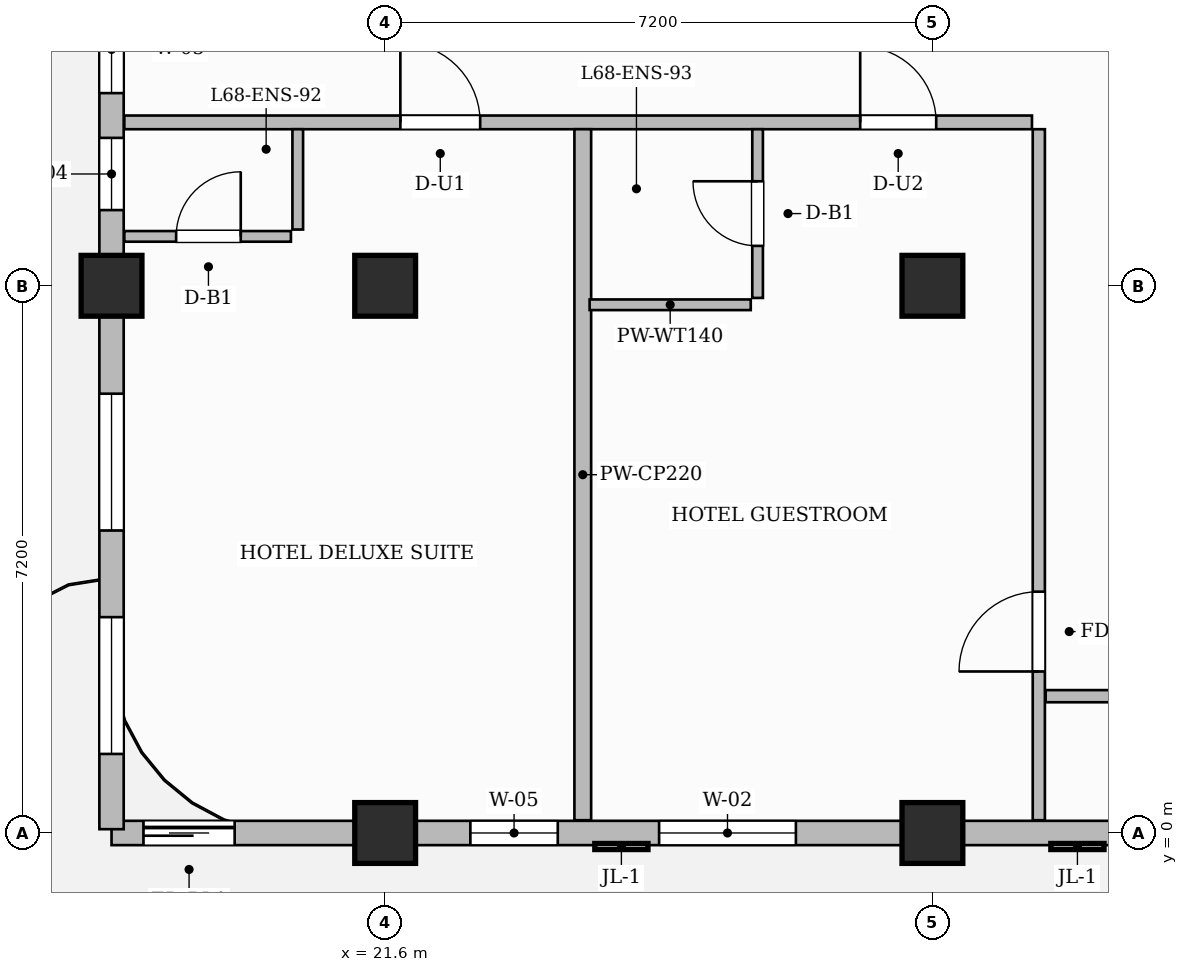
"""IFC4 building model, lengths in metres.
Left out: names, types, materials, properties, quantities, classifications, styles, units other than length and angle.
Written with IfcOpenShell. Run it as: python <this file> out.ifc"""

import sys

from ifc_helpers import new_model, si_unit, direction, frame, frame_2d, origin, origin_2d, place, context, subcontext, project, spatial, rectangle, extrude, source, transform, mapped, element, fill, save


model = new_model("IFC4")
c1 = context("Model", 3, precision=1e-05, world=origin(), true_north=direction((0.0, 1.0)))
c2 = subcontext(c1, "Body", "Model", "MODEL_VIEW")
j1 = project(units=[si_unit("LENGTHUNIT", "METRE"), si_unit("PLANEANGLEUNIT", "RADIAN")], contexts=[c1])
p1 = place(None, origin())
s1 = spatial("IfcSite", under=j1, at=p1, CompositionType="ELEMENT")
p2 = place(p1, origin())
s2 = spatial("IfcBuilding", under=s1, at=p2, CompositionType="ELEMENT")
p3 = place(p2, frame((0.0, 0.0, 271.2)))
s3 = spatial("IfcBuildingStorey", under=s2, at=p3, CompositionType="ELEMENT", Elevation=271.2)
m1 = source(origin(), c2, "Body", "SweptSolid", [
    extrude(rectangle(XDim=0.8, YDim=0.8, at=origin_2d()), origin(), (0.0, 0.0, 1.0), 3.85),
])
for number, where, z_axis, x_axis in (
    (1, (21.6, 0.0, 0.0), (0.0, 0.0, 1.0), (1.0, 0.0, 0.0)),
    (2, (21.6, 7.2, 0.0), (0.0, 0.0, 1.0), (1.0, 0.0, 0.0)),
    (3, (28.8, 0.0, 0.0), (0.0, 0.0, 1.0), (1.0, 0.0, 0.0)),
    (4, (28.8, 7.2, 0.0), (0.0, 0.0, 1.0), (1.0, 0.0, 0.0)),
    (5, (18.0, 7.2, 0.0), (0.0, 0.0, 1.0), (1.0, 0.0, 0.0)),
):
    element("IfcColumn", number, at=place(p3, frame(where, z_axis=z_axis, x_axis=x_axis)), inside=s3, PredefinedType="COLUMN", context=c2, shape_type="MappedRepresentation", body=[
        mapped(m1, transform((0.0, 0.0, 0.0), scale=1.0)),
    ])
p4 = place(p3, frame((18.168, 9.35, 0.0), z_axis=(0.0, 0.0, 1.0), x_axis=(1.0, 0.0, 0.0)))
e6 = element("IfcWall", 6, at=p4, inside=s3, PredefinedType="PARTITIONING", context=c2, shape_type="SweptSolid", body=[
    extrude(rectangle(XDim=11.942, YDim=0.18, at=frame_2d((5.971, 0.0))), origin(), (0.0, 0.0, 1.0), 3.6),
])
p5 = place(p4, frame((3.632, 0.0, 0.0)))
e7 = element("IfcOpeningElement", 7, at=p5, cuts=e6, PredefinedType="OPENING", context=c2, shape_type="SweptSolid", body=[
    extrude(rectangle(XDim=1.05, YDim=2.25, at=frame_2d((0.525, 1.125))), frame((0.0, 0.1, 0.0), z_axis=(0.0, -1.0, 0.0), x_axis=(1.0, 0.0, 0.0)), (0.0, 0.0, 1.0), 0.2),
])
p6 = place(p4, frame((9.682, 0.0, 0.0)))
e8 = element("IfcOpeningElement", 8, at=p6, cuts=e6, PredefinedType="OPENING", context=c2, shape_type="SweptSolid", body=[
    extrude(rectangle(XDim=1.0, YDim=2.2, at=frame_2d((0.5, 1.1))), frame((0.0, 0.1, 0.0), z_axis=(0.0, -1.0, 0.0), x_axis=(1.0, 0.0, 0.0)), (0.0, 0.0, 1.0), 0.2),
])
p7 = place(p3, frame((30.2, 0.168, 0.0), z_axis=(0.0, 0.0, 1.0), x_axis=(0.0, 1.0, 0.0)))
e9 = element("IfcWall", 9, at=p7, inside=s3, PredefinedType="PARTITIONING", context=c2, shape_type="SweptSolid", body=[
    extrude(rectangle(XDim=9.092, YDim=0.16, at=frame_2d((4.546, 0.0))), origin(), (0.0, 0.0, 1.0), 3.6),
])
p8 = place(p7, frame((1.957, 0.0, 0.0)))
e10 = element("IfcOpeningElement", 10, at=p8, cuts=e9, PredefinedType="OPENING", context=c2, shape_type="SweptSolid", body=[
    extrude(rectangle(XDim=1.05, YDim=2.15, at=frame_2d((0.525, 1.075))), frame((0.0, 0.09, 0.0), z_axis=(0.0, -1.0, 0.0), x_axis=(1.0, 0.0, 0.0)), (0.0, 0.0, 1.0), 0.18),
])
p9 = place(p3, frame((30.29, 1.8, 0.0), z_axis=(0.0, 0.0, 1.0), x_axis=(1.0, 0.0, 0.0)))
e11 = element("IfcWall", 11, at=p9, inside=s3, PredefinedType="PARTITIONING", context=c2, shape_type="SweptSolid", body=[
    extrude(rectangle(XDim=19.37, YDim=0.16, at=frame_2d((9.685, 0.0))), origin(), (0.0, 0.0, 1.0), 3.6),
])
p10 = place(p9, frame((3.054, 0.0, 0.0)))
e12 = element("IfcOpeningElement", 12, at=p10, cuts=e11, PredefinedType="OPENING", context=c2, shape_type="SweptSolid", body=[
    extrude(rectangle(XDim=0.9, YDim=2.15, at=frame_2d((0.45, 1.075))), frame((0.0, 0.09, 0.0), z_axis=(0.0, -1.0, 0.0), x_axis=(1.0, 0.0, 0.0)), (0.0, 0.0, 1.0), 0.18),
])
p11 = place(p9, frame((9.66, 0.0, 0.0)))
e13 = element("IfcOpeningElement", 13, at=p11, cuts=e11, PredefinedType="OPENING", context=c2, shape_type="SweptSolid", body=[
    extrude(rectangle(XDim=0.9, YDim=2.15, at=frame_2d((0.45, 1.075))), frame((0.0, 0.09, 0.0), z_axis=(0.0, -1.0, 0.0), x_axis=(1.0, 0.0, 0.0)), (0.0, 0.0, 1.0), 0.18),
])
p12 = place(p9, frame((15.86, 0.0, 0.0)))
e14 = element("IfcOpeningElement", 14, at=p12, cuts=e11, PredefinedType="OPENING", context=c2, shape_type="SweptSolid", body=[
    extrude(rectangle(XDim=0.9, YDim=2.15, at=frame_2d((0.45, 1.075))), frame((0.0, 0.09, 0.0), z_axis=(0.0, -1.0, 0.0), x_axis=(1.0, 0.0, 0.0)), (0.0, 0.0, 1.0), 0.18),
])
p13 = place(p3, frame((24.2, 0.168, 0.0), z_axis=(0.0, 0.0, 1.0), x_axis=(0.0, 1.0, 0.0)))
e15 = element("IfcWall", 15, at=p13, inside=s3, PredefinedType="PARTITIONING", context=c2, shape_type="SweptSolid", body=[
    extrude(rectangle(XDim=9.092, YDim=0.22, at=frame_2d((4.546, 0.0))), origin(), (0.0, 0.0, 1.0), 3.6),
])
p14 = place(p3, frame((20.45, 7.94, 0.0), z_axis=(0.0, 0.0, 1.0), x_axis=(0.0, 1.0, 0.0)))
e16 = element("IfcWall", 16, at=p14, inside=s3, PredefinedType="PARTITIONING", context=c2, shape_type="SweptSolid", body=[
    extrude(rectangle(XDim=1.32, YDim=0.14, at=frame_2d((0.66, 0.0))), origin(), (0.0, 0.0, 1.0), 3.6),
])
p15 = place(p3, frame((18.168, 7.85, 0.0), z_axis=(0.0, 0.0, 1.0), x_axis=(1.0, 0.0, 0.0)))
e17 = element("IfcWall", 17, at=p15, inside=s3, PredefinedType="PARTITIONING", context=c2, shape_type="SweptSolid", body=[
    extrude(rectangle(XDim=2.192, YDim=0.14, at=frame_2d((1.096, 0.0))), origin(), (0.0, 0.0, 1.0), 3.6),
])
p16 = place(p15, frame((0.682, 0.0, 0.0)))
e18 = element("IfcOpeningElement", 18, at=p16, cuts=e17, PredefinedType="OPENING", context=c2, shape_type="SweptSolid", body=[
    extrude(rectangle(XDim=0.85, YDim=2.1, at=frame_2d((0.425, 1.05))), frame((0.0, 0.08, 0.0), z_axis=(0.0, -1.0, 0.0), x_axis=(1.0, 0.0, 0.0)), (0.0, 0.0, 1.0), 0.16),
])
p17 = place(p3, frame((26.5, 7.04, 0.0), z_axis=(0.0, 0.0, 1.0), x_axis=(0.0, 1.0, 0.0)))
e19 = element("IfcWall", 19, at=p17, inside=s3, PredefinedType="PARTITIONING", context=c2, shape_type="SweptSolid", body=[
    extrude(rectangle(XDim=2.22, YDim=0.14, at=frame_2d((1.11, 0.0))), origin(), (0.0, 0.0, 1.0), 3.6),
])
p18 = place(p17, frame((0.685, 0.0, 0.0)))
e20 = element("IfcOpeningElement", 20, at=p18, cuts=e19, PredefinedType="OPENING", context=c2, shape_type="SweptSolid", body=[
    extrude(rectangle(XDim=0.85, YDim=2.1, at=frame_2d((0.425, 1.05))), frame((0.0, 0.08, 0.0), z_axis=(0.0, -1.0, 0.0), x_axis=(1.0, 0.0, 0.0)), (0.0, 0.0, 1.0), 0.16),
])
p19 = place(p3, frame((24.29, 6.95, 0.0), z_axis=(0.0, 0.0, 1.0), x_axis=(1.0, 0.0, 0.0)))
e21 = element("IfcWall", 21, at=p19, inside=s3, PredefinedType="PARTITIONING", context=c2, shape_type="SweptSolid", body=[
    extrude(rectangle(XDim=2.12, YDim=0.14, at=frame_2d((1.06, 0.0))), origin(), (0.0, 0.0, 1.0), 3.185),
])
p20 = place(p3, frame((18.0, 0.0, 0.0), z_axis=(0.0, 0.0, 1.0), x_axis=(1.0, 0.0, 0.0)))
e22 = element("IfcWall", 22, at=p20, inside=s3, PredefinedType="SOLIDWALL", context=c2, shape_type="SweptSolid", body=[
    extrude(rectangle(XDim=31.8, YDim=0.32, at=frame_2d((15.9, 0.0))), origin(), (0.0, 0.0, 1.0), 3.185),
])
p21 = place(p20, frame((0.42, 0.0, 0.0)))
e23 = element("IfcOpeningElement", 23, at=p21, cuts=e22, PredefinedType="OPENING", context=c2, shape_type="SweptSolid", body=[
    extrude(rectangle(XDim=1.2, YDim=2.2, at=frame_2d((0.6, 1.1))), frame((0.0, 0.17, 0.0), z_axis=(0.0, -1.0, 0.0), x_axis=(1.0, 0.0, 0.0)), (0.0, 0.0, 1.0), 0.34),
])
p22 = place(p20, frame((4.721, 0.0, 0.8)))
e24 = element("IfcOpeningElement", 24, at=p22, cuts=e22, PredefinedType="OPENING", context=c2, shape_type="SweptSolid", body=[
    extrude(rectangle(XDim=1.15, YDim=1.8, at=frame_2d((0.575, 0.9))), frame((0.0, 0.17, 0.0), z_axis=(0.0, -1.0, 0.0), x_axis=(1.0, 0.0, 0.0)), (0.0, 0.0, 1.0), 0.34),
])
p23 = place(p20, frame((7.204, 0.0, 0.8)))
e25 = element("IfcOpeningElement", 25, at=p23, cuts=e22, PredefinedType="OPENING", context=c2, shape_type="SweptSolid", body=[
    extrude(rectangle(XDim=1.8, YDim=1.85, at=frame_2d((0.9, 0.925))), frame((0.0, 0.17, 0.0), z_axis=(0.0, -1.0, 0.0), x_axis=(1.0, 0.0, 0.0)), (0.0, 0.0, 1.0), 0.34),
])
p24 = place(p20, frame((13.204, 0.0, 0.8)))
e26 = element("IfcOpeningElement", 26, at=p24, cuts=e22, PredefinedType="OPENING", context=c2, shape_type="SweptSolid", body=[
    extrude(rectangle(XDim=1.8, YDim=1.85, at=frame_2d((0.9, 0.925))), frame((0.0, 0.17, 0.0), z_axis=(0.0, -1.0, 0.0), x_axis=(1.0, 0.0, 0.0)), (0.0, 0.0, 1.0), 0.34),
])
p25 = place(p20, frame((17.921, 0.0, 0.8)))
e27 = element("IfcOpeningElement", 27, at=p25, cuts=e22, PredefinedType="OPENING", context=c2, shape_type="SweptSolid", body=[
    extrude(rectangle(XDim=0.95, YDim=1.75, at=frame_2d((0.475, 0.875))), frame((0.0, 0.17, 0.0), z_axis=(0.0, -1.0, 0.0), x_axis=(1.0, 0.0, 0.0)), (0.0, 0.0, 1.0), 0.34),
])
p26 = place(p20, frame((20.304, 0.0, 0.8)))
e28 = element("IfcOpeningElement", 28, at=p26, cuts=e22, PredefinedType="OPENING", context=c2, shape_type="SweptSolid", body=[
    extrude(rectangle(XDim=1.8, YDim=1.85, at=frame_2d((0.9, 0.925))), frame((0.0, 0.17, 0.0), z_axis=(0.0, -1.0, 0.0), x_axis=(1.0, 0.0, 0.0)), (0.0, 0.0, 1.0), 0.34),
])
p27 = place(p20, frame((26.081, 0.0, 0.8)))
e29 = element("IfcOpeningElement", 29, at=p27, cuts=e22, PredefinedType="OPENING", context=c2, shape_type="SweptSolid", body=[
    extrude(rectangle(XDim=1.8, YDim=1.85, at=frame_2d((0.9, 0.925))), frame((0.0, 0.17, 0.0), z_axis=(0.0, -1.0, 0.0), x_axis=(1.0, 0.0, 0.0)), (0.0, 0.0, 1.0), 0.34),
])
p28 = place(p20, frame((28.727, 0.0, 0.8)))
e30 = element("IfcOpeningElement", 30, at=p28, cuts=e22, PredefinedType="OPENING", context=c2, shape_type="SweptSolid", body=[
    extrude(rectangle(XDim=1.8, YDim=1.85, at=frame_2d((0.9, 0.925))), frame((0.0, 0.17, 0.0), z_axis=(0.0, -1.0, 0.0), x_axis=(1.0, 0.0, 0.0)), (0.0, 0.0, 1.0), 0.34),
])
p29 = place(p3, frame((18.0, 0.05, 0.0), z_axis=(0.0, 0.0, 1.0), x_axis=(0.0, 1.0, 0.0)))
e31 = element("IfcWall", 31, at=p29, inside=s3, PredefinedType="SOLIDWALL", context=c2, shape_type="SweptSolid", body=[
    extrude(rectangle(XDim=21.5, YDim=0.32, at=frame_2d((10.75, 0.0))), origin(), (0.0, 0.0, 1.0), 3.6),
])
p30 = place(p29, frame((0.99, 0.0, 0.8)))
e32 = element("IfcOpeningElement", 32, at=p30, cuts=e31, PredefinedType="OPENING", context=c2, shape_type="SweptSolid", body=[
    extrude(rectangle(XDim=1.8, YDim=1.85, at=frame_2d((0.9, 0.925))), frame((0.0, 0.17, 0.0), z_axis=(0.0, -1.0, 0.0), x_axis=(1.0, 0.0, 0.0)), (0.0, 0.0, 1.0), 0.34),
])
p31 = place(p29, frame((3.93, 0.0, 0.8)))
e33 = element("IfcOpeningElement", 33, at=p31, cuts=e31, PredefinedType="OPENING", context=c2, shape_type="SweptSolid", body=[
    extrude(rectangle(XDim=1.8, YDim=1.85, at=frame_2d((0.9, 0.925))), frame((0.0, 0.17, 0.0), z_axis=(0.0, -1.0, 0.0), x_axis=(1.0, 0.0, 0.0)), (0.0, 0.0, 1.0), 0.34),
])
p32 = place(p29, frame((8.146, 0.0, 0.8)))
e34 = element("IfcOpeningElement", 34, at=p32, cuts=e31, PredefinedType="OPENING", context=c2, shape_type="SweptSolid", body=[
    extrude(rectangle(XDim=0.95, YDim=1.75, at=frame_2d((0.475, 0.875))), frame((0.0, 0.17, 0.0), z_axis=(0.0, -1.0, 0.0), x_axis=(1.0, 0.0, 0.0)), (0.0, 0.0, 1.0), 0.34),
])
p33 = place(p29, frame((9.685, 0.0, 0.8)))
e35 = element("IfcOpeningElement", 35, at=p33, cuts=e31, PredefinedType="OPENING", context=c2, shape_type="SweptSolid", body=[
    extrude(rectangle(XDim=1.15, YDim=1.8, at=frame_2d((0.575, 0.9))), frame((0.0, 0.17, 0.0), z_axis=(0.0, -1.0, 0.0), x_axis=(1.0, 0.0, 0.0)), (0.0, 0.0, 1.0), 0.34),
])
p34 = place(p29, frame((11.689, 0.0, 0.8)))
e36 = element("IfcOpeningElement", 36, at=p34, cuts=e31, PredefinedType="OPENING", context=c2, shape_type="SweptSolid", body=[
    extrude(rectangle(XDim=1.4, YDim=1.85, at=frame_2d((0.7, 0.925))), frame((0.0, 0.17, 0.0), z_axis=(0.0, -1.0, 0.0), x_axis=(1.0, 0.0, 0.0)), (0.0, 0.0, 1.0), 0.34),
])
p35 = place(p29, frame((15.77, 0.0, 0.8)))
e37 = element("IfcOpeningElement", 37, at=p35, cuts=e31, PredefinedType="OPENING", context=c2, shape_type="SweptSolid", body=[
    extrude(rectangle(XDim=1.8, YDim=1.85, at=frame_2d((0.9, 0.925))), frame((0.0, 0.17, 0.0), z_axis=(0.0, -1.0, 0.0), x_axis=(1.0, 0.0, 0.0)), (0.0, 0.0, 1.0), 0.34),
])
p36 = place(p29, frame((18.71, 0.0, 0.8)))
e38 = element("IfcOpeningElement", 38, at=p36, cuts=e31, PredefinedType="OPENING", context=c2, shape_type="SweptSolid", body=[
    extrude(rectangle(XDim=1.8, YDim=1.85, at=frame_2d((0.9, 0.925))), frame((0.0, 0.17, 0.0), z_axis=(0.0, -1.0, 0.0), x_axis=(1.0, 0.0, 0.0)), (0.0, 0.0, 1.0), 0.34),
])
m2 = source(origin(), c2, "Body", "SweptSolid", [
    extrude(rectangle(XDim=1.05, YDim=2.15, at=frame_2d((0.525, 1.075))), frame((0.0, 0.025, 0.0), z_axis=(0.0, -1.0, 0.0), x_axis=(1.0, 0.0, 0.0)), (0.0, 0.0, 1.0), 0.05),
])
p37 = place(p8, origin())
e39 = element("IfcDoor", 39, at=p37, inside=s3, OperationType="SINGLE_SWING_LEFT", PredefinedType="DOOR", context=c2, shape_type="MappedRepresentation", body=[
    mapped(m2, transform((0.0, 0.0, 0.0), scale=1.0)),
])
fill(e10, e39)
m3 = source(origin(), c2, "Body", "SweptSolid", [
    extrude(rectangle(XDim=0.85, YDim=2.1, at=frame_2d((0.425, 1.05))), frame((0.0, 0.025, 0.0), z_axis=(0.0, -1.0, 0.0), x_axis=(1.0, 0.0, 0.0)), (0.0, 0.0, 1.0), 0.05),
])
p38 = place(p16, origin())
e40 = element("IfcDoor", 40, at=p38, inside=s3, OperationType="SINGLE_SWING_RIGHT", PredefinedType="DOOR", context=c2, shape_type="MappedRepresentation", body=[
    mapped(m3, transform((0.0, 0.0, 0.0), scale=1.0)),
])
fill(e18, e40)
m4 = source(origin(), c2, "Body", "SweptSolid", [
    extrude(rectangle(XDim=1.05, YDim=2.25, at=frame_2d((0.525, 1.125))), frame((0.0, 0.025, 0.0), z_axis=(0.0, -1.0, 0.0), x_axis=(1.0, 0.0, 0.0)), (0.0, 0.0, 1.0), 0.05),
])
p39 = place(p5, origin())
e41 = element("IfcDoor", 41, at=p39, inside=s3, OperationType="SINGLE_SWING_LEFT", PredefinedType="DOOR", context=c2, shape_type="MappedRepresentation", body=[
    mapped(m4, transform((0.0, 0.0, 0.0), scale=1.0)),
])
fill(e7, e41)
p40 = place(p18, origin())
e42 = element("IfcDoor", 42, at=p40, inside=s3, OperationType="SINGLE_SWING_RIGHT", PredefinedType="DOOR", context=c2, shape_type="MappedRepresentation", body=[
    mapped(m3, transform((0.0, 0.0, 0.0), scale=1.0)),
])
fill(e20, e42)
m5 = source(origin(), c2, "Body", "SweptSolid", [
    extrude(rectangle(XDim=1.0, YDim=2.2, at=frame_2d((0.5, 1.1))), frame((0.0, 0.025, 0.0), z_axis=(0.0, -1.0, 0.0), x_axis=(1.0, 0.0, 0.0)), (0.0, 0.0, 1.0), 0.05),
])
p41 = place(p6, origin())
e43 = element("IfcDoor", 43, at=p41, inside=s3, OperationType="SINGLE_SWING_LEFT", PredefinedType="DOOR", context=c2, shape_type="MappedRepresentation", body=[
    mapped(m5, transform((0.0, 0.0, 0.0), scale=1.0)),
])
fill(e8, e43)
m6 = source(origin(), c2, "Body", "SweptSolid", [
    extrude(rectangle(XDim=1.2, YDim=2.2, at=frame_2d((0.6, 1.1))), frame((0.0, 0.025, 0.0), z_axis=(0.0, -1.0, 0.0), x_axis=(1.0, 0.0, 0.0)), (0.0, 0.0, 1.0), 0.05),
])
p42 = place(p21, origin())
e44 = element("IfcDoor", 44, at=p42, inside=s3, OperationType="SLIDING_TO_LEFT", PredefinedType="DOOR", context=c2, shape_type="MappedRepresentation", body=[
    mapped(m6, transform((0.0, 0.0, 0.0), scale=1.0)),
])
fill(e23, e44)
m7 = source(origin(), c2, "Body", "SweptSolid", [
    extrude(rectangle(XDim=1.15, YDim=1.8, at=frame_2d((0.575, 0.9))), frame((0.0, 0.03, 0.0), z_axis=(0.0, -1.0, 0.0), x_axis=(1.0, 0.0, 0.0)), (0.0, 0.0, 1.0), 0.06),
])
p43 = place(p22, origin())
e45 = element("IfcWindow", 45, at=p43, inside=s3, PartitioningType="SINGLE_PANEL", PredefinedType="WINDOW", context=c2, shape_type="MappedRepresentation", body=[
    mapped(m7, transform((0.0, 0.0, 0.0), scale=1.0)),
])
fill(e24, e45)
m8 = source(origin(), c2, "Body", "SweptSolid", [
    extrude(rectangle(XDim=1.8, YDim=1.85, at=frame_2d((0.9, 0.925))), frame((0.0, 0.03, 0.0), z_axis=(0.0, -1.0, 0.0), x_axis=(1.0, 0.0, 0.0)), (0.0, 0.0, 1.0), 0.06),
])
p44 = place(p23, origin())
e46 = element("IfcWindow", 46, at=p44, inside=s3, PartitioningType="DOUBLE_PANEL_VERTICAL", PredefinedType="WINDOW", context=c2, shape_type="MappedRepresentation", body=[
    mapped(m8, transform((0.0, 0.0, 0.0), scale=1.0)),
])
fill(e25, e46)
p45 = place(p30, origin())
e47 = element("IfcWindow", 47, at=p45, inside=s3, PartitioningType="DOUBLE_PANEL_VERTICAL", PredefinedType="WINDOW", context=c2, shape_type="MappedRepresentation", body=[
    mapped(m8, transform((0.0, 0.0, 0.0), scale=1.0)),
])
fill(e32, e47)
p46 = place(p31, origin())
e48 = element("IfcWindow", 48, at=p46, inside=s3, PartitioningType="DOUBLE_PANEL_VERTICAL", PredefinedType="WINDOW", context=c2, shape_type="MappedRepresentation", body=[
    mapped(m8, transform((0.0, 0.0, 0.0), scale=1.0)),
])
fill(e33, e48)
m9 = source(origin(), c2, "Body", "SweptSolid", [
    extrude(rectangle(XDim=0.95, YDim=1.75, at=frame_2d((0.475, 0.875))), frame((0.0, 0.03, 0.0), z_axis=(0.0, -1.0, 0.0), x_axis=(1.0, 0.0, 0.0)), (0.0, 0.0, 1.0), 0.06),
])
p47 = place(p32, origin())
e49 = element("IfcWindow", 49, at=p47, inside=s3, PartitioningType="SINGLE_PANEL", PredefinedType="WINDOW", context=c2, shape_type="MappedRepresentation", body=[
    mapped(m9, transform((0.0, 0.0, 0.0), scale=1.0)),
])
fill(e34, e49)
p48 = place(p33, origin())
e50 = element("IfcWindow", 50, at=p48, inside=s3, PartitioningType="SINGLE_PANEL", PredefinedType="WINDOW", context=c2, shape_type="MappedRepresentation", body=[
    mapped(m7, transform((0.0, 0.0, 0.0), scale=1.0)),
])
fill(e35, e50)
save(model, sys.argv[1])
